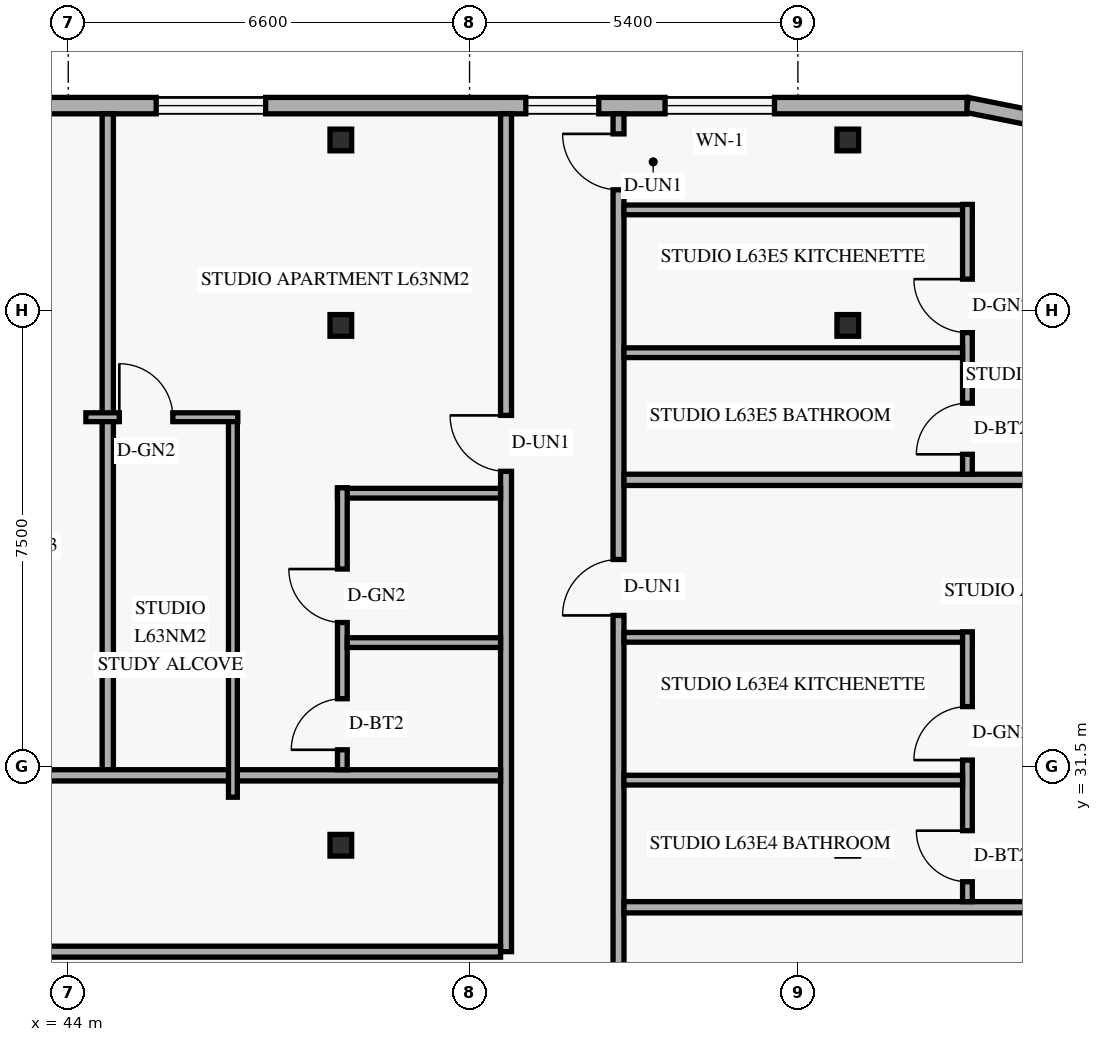
"""IFC4 building model, lengths in metres.
Left out: names, types, materials, properties, quantities, classifications, styles, units other than length and angle.
Written with IfcOpenShell. Run it as: python <this file> out.ifc"""

import sys

from ifc_helpers import new_model, si_unit, direction, frame, frame_2d, origin, origin_2d, place, context, subcontext, project, spatial, rectangle, hollow_rectangle, extrude, element, fill, save


model = new_model("IFC4")
c1 = context("Model", 3, precision=1e-05, world=origin(), true_north=direction((0.0, 1.0)))
c2 = subcontext(c1, "Body", "Model", "MODEL_VIEW")
j1 = project(units=[si_unit("LENGTHUNIT", "METRE"), si_unit("PLANEANGLEUNIT", "RADIAN")], contexts=[c1])
p1 = place(None, origin())
s1 = spatial("IfcSite", under=j1, at=p1, CompositionType="ELEMENT")
p2 = place(p1, origin())
s2 = spatial("IfcBuilding", under=s1, at=p2, CompositionType="ELEMENT")
p3 = place(p2, frame((0.0, 0.0, 242.4)))
s3 = spatial("IfcBuildingStorey", under=s2, at=p3, CompositionType="ELEMENT", Elevation=242.4)
for number, where, z_axis, x_axis in (
    (1, (48.42, 30.2, 0.0), (0.035, 0.0, 0.999), (0.0, 1.0, 0.0)),
    (2, (48.42, 38.75, 0.0), (0.035, 0.0, 0.999), (0.0, 1.0, 0.0)),
    (3, (48.42, 41.8, 0.0), (0.035, 0.0, 0.999), (0.0, 1.0, 0.0)),
):
    element("IfcColumn", number, at=place(p3, frame(where, z_axis=z_axis, x_axis=x_axis)), inside=s3, PredefinedType="COLUMN", context=c2, shape_type="SweptSolid", body=[
        extrude(hollow_rectangle(XDim=0.356, YDim=0.356, WallThickness=0.016, at=origin_2d()), origin(), (0.0, 0.0, 1.0), 3.602),
    ])
for number, where, z_axis, x_axis in (
    (4, (56.716, 30.2, 0.0), (0.058, 0.0, 0.998), (0.0, 1.0, 0.0)),
    (5, (56.716, 38.75, 0.0), (0.058, 0.0, 0.998), (0.0, 1.0, 0.0)),
    (6, (56.716, 41.8, 0.0), (0.058, 0.0, 0.998), (0.0, 1.0, 0.0)),
):
    element("IfcColumn", number, at=place(p3, frame(where, z_axis=z_axis, x_axis=x_axis)), inside=s3, PredefinedType="COLUMN", context=c2, shape_type="SweptSolid", body=[
        extrude(hollow_rectangle(XDim=0.356, YDim=0.356, WallThickness=0.016, at=origin_2d()), origin(), (0.0, 0.0, 1.0), 3.606),
    ])
p4 = place(p3, frame((60.146, 42.105, 0.0), z_axis=(0.0, 0.0, 1.0), x_axis=(-0.980809899341, 0.19496651342, 0.0)))
e7 = element("IfcWall", 7, at=p4, inside=s3, PredefinedType="SOLIDWALL", context=c2, shape_type="SweptSolid", body=[
    extrude(rectangle(XDim=1.389, YDim=0.25, at=frame_2d((0.694, 0.0))), origin(), (0.0, 0.0, 1.0), 3.36),
])
p5 = place(p3, frame((58.78, 42.365, 0.0), z_axis=(0.0, 0.0, 1.0), x_axis=(-1.0, 0.0, 0.0)))
e8 = element("IfcWall", 8, at=p5, inside=s3, PredefinedType="SOLIDWALL", context=c2, shape_type="SweptSolid", body=[
    extrude(rectangle(XDim=32.96, YDim=0.27, at=frame_2d((16.48, 0.0))), origin(), (0.0, 0.0, 1.0), 3.36),
])
p6 = place(p5, frame((17.735, 0.0, 0.85)))
e9 = element("IfcOpeningElement", 9, at=p6, cuts=e8, PredefinedType="OPENING", context=c2, shape_type="SweptSolid", body=[
    extrude(rectangle(XDim=1.8, YDim=1.6, at=frame_2d((0.9, 0.8))), frame((0.0, 0.145, 0.0), z_axis=(0.0, -1.0, 0.0), x_axis=(1.0, 0.0, 0.0)), (0.0, 0.0, 1.0), 0.29),
])
p7 = place(p5, frame((11.533, 0.0, 0.85)))
e10 = element("IfcOpeningElement", 10, at=p7, cuts=e8, PredefinedType="OPENING", context=c2, shape_type="SweptSolid", body=[
    extrude(rectangle(XDim=1.8, YDim=1.6, at=frame_2d((0.9, 0.8))), frame((0.0, 0.145, 0.0), z_axis=(0.0, -1.0, 0.0), x_axis=(1.0, 0.0, 0.0)), (0.0, 0.0, 1.0), 0.29),
])
p8 = place(p5, frame((6.055, 0.0, 0.85)))
e11 = element("IfcOpeningElement", 11, at=p8, cuts=e8, PredefinedType="OPENING", context=c2, shape_type="SweptSolid", body=[
    extrude(rectangle(XDim=1.2, YDim=1.5, at=frame_2d((0.6, 0.75))), frame((0.0, 0.145, 0.0), z_axis=(0.0, -1.0, 0.0), x_axis=(1.0, 0.0, 0.0)), (0.0, 0.0, 1.0), 0.29),
])
p9 = place(p5, frame((3.165, 0.0, 0.85)))
e12 = element("IfcOpeningElement", 12, at=p9, cuts=e8, PredefinedType="OPENING", context=c2, shape_type="SweptSolid", body=[
    extrude(rectangle(XDim=1.8, YDim=1.6, at=frame_2d((0.9, 0.8))), frame((0.0, 0.145, 0.0), z_axis=(0.0, -1.0, 0.0), x_axis=(1.0, 0.0, 0.0)), (0.0, 0.0, 1.0), 0.29),
])
p10 = place(p3, frame((51.2, 28.45, 0.0), z_axis=(0.0, 0.0, 1.0), x_axis=(0.0, 1.0, 0.0)))
e13 = element("IfcWall", 13, at=p10, inside=s3, PredefinedType="STANDARD", context=c2, shape_type="SweptSolid", body=[
    extrude(rectangle(XDim=13.78, YDim=0.18, at=frame_2d((6.89, 0.0))), origin(), (0.0, 0.0, 1.0), 2.803),
])
p11 = place(p10, frame((7.9, 0.0, 0.0)))
e14 = element("IfcOpeningElement", 14, at=p11, cuts=e13, PredefinedType="OPENING", context=c2, shape_type="SweptSolid", body=[
    extrude(rectangle(XDim=0.92, YDim=2.15, at=frame_2d((0.46, 1.075))), frame((0.0, 0.1, 0.0), z_axis=(0.0, -1.0, 0.0), x_axis=(1.0, 0.0, 0.0)), (0.0, 0.0, 1.0), 0.2),
])
p12 = place(p3, frame((37.64, 28.45, 0.0), z_axis=(0.0, 0.0, 1.0), x_axis=(1.0, 0.0, 0.0)))
e15 = element("IfcWall", 15, at=p12, inside=s3, PredefinedType="STANDARD", context=c2, shape_type="SweptSolid", body=[
    extrude(rectangle(XDim=13.47, YDim=0.18, at=frame_2d((6.735, 0.0))), origin(), (0.0, 0.0, 1.0), 2.803),
])
p13 = place(p3, frame((53.05, 5.77, 0.0), z_axis=(0.0, 0.0, 1.0), x_axis=(0.0, 1.0, 0.0)))
e16 = element("IfcWall", 16, at=p13, inside=s3, PredefinedType="STANDARD", context=c2, shape_type="SweptSolid", body=[
    extrude(rectangle(XDim=36.46, YDim=0.18, at=frame_2d((18.23, 0.0))), origin(), (0.0, 0.0, 1.0), 2.803),
])
p14 = place(p13, frame((1.357, 0.0, 0.0)))
e17 = element("IfcOpeningElement", 17, at=p14, cuts=e16, PredefinedType="OPENING", context=c2, shape_type="SweptSolid", body=[
    extrude(rectangle(XDim=0.92, YDim=2.15, at=frame_2d((0.46, 1.075))), frame((0.0, 0.1, 0.0), z_axis=(0.0, -1.0, 0.0), x_axis=(1.0, 0.0, 0.0)), (0.0, 0.0, 1.0), 0.2),
])
p15 = place(p13, frame((12.03, 0.0, 0.0)))
e18 = element("IfcOpeningElement", 18, at=p15, cuts=e16, PredefinedType="OPENING", context=c2, shape_type="SweptSolid", body=[
    extrude(rectangle(XDim=0.92, YDim=2.15, at=frame_2d((0.46, 1.075))), frame((0.0, 0.1, 0.0), z_axis=(0.0, -1.0, 0.0), x_axis=(1.0, 0.0, 0.0)), (0.0, 0.0, 1.0), 0.2),
])
p16 = place(p13, frame((20.27, 0.0, 0.0)))
e19 = element("IfcOpeningElement", 19, at=p16, cuts=e16, PredefinedType="OPENING", context=c2, shape_type="SweptSolid", body=[
    extrude(rectangle(XDim=0.92, YDim=2.15, at=frame_2d((0.46, 1.075))), frame((0.0, 0.1, 0.0), z_axis=(0.0, -1.0, 0.0), x_axis=(1.0, 0.0, 0.0)), (0.0, 0.0, 1.0), 0.2),
])
p17 = place(p13, frame((28.21, 0.0, 0.0)))
e20 = element("IfcOpeningElement", 20, at=p17, cuts=e16, PredefinedType="OPENING", context=c2, shape_type="SweptSolid", body=[
    extrude(rectangle(XDim=0.92, YDim=2.15, at=frame_2d((0.46, 1.075))), frame((0.0, 0.1, 0.0), z_axis=(0.0, -1.0, 0.0), x_axis=(1.0, 0.0, 0.0)), (0.0, 0.0, 1.0), 0.2),
])
p18 = place(p13, frame((35.21, 0.0, 0.0)))
e21 = element("IfcOpeningElement", 21, at=p18, cuts=e16, PredefinedType="OPENING", context=c2, shape_type="SweptSolid", body=[
    extrude(rectangle(XDim=0.92, YDim=2.15, at=frame_2d((0.46, 1.075))), frame((0.0, 0.1, 0.0), z_axis=(0.0, -1.0, 0.0), x_axis=(1.0, 0.0, 0.0)), (0.0, 0.0, 1.0), 0.2),
])
p19 = place(p3, frame((53.14, 29.18, 0.0), z_axis=(0.0, 0.0, 1.0), x_axis=(1.0, 0.0, 0.0)))
e22 = element("IfcWall", 22, at=p19, inside=s3, PredefinedType="PARTITIONING", context=c2, shape_type="SweptSolid", body=[
    extrude(rectangle(XDim=8.99, YDim=0.185, at=frame_2d((4.495, 0.0))), origin(), (0.0, 0.0, 1.0), 2.879),
])
p20 = place(p3, frame((53.14, 33.62, 0.0), z_axis=(0.0, 0.0, 1.0), x_axis=(1.0, 0.0, 0.0)))
e23 = element("IfcWall", 23, at=p20, inside=s3, PredefinedType="PLUMBINGWALL", context=c2, shape_type="SweptSolid", body=[
    extrude(rectangle(XDim=5.728, YDim=0.16, at=frame_2d((2.864, 0.0))), origin(), (0.0, 0.0, 1.0), 2.879),
])
p21 = place(p3, frame((58.788, 29.272, 0.0), z_axis=(0.0, 0.0, 1.0), x_axis=(0.0, 1.0, 0.0)))
e24 = element("IfcWall", 24, at=p21, inside=s3, PredefinedType="PLUMBINGWALL", context=c2, shape_type="SweptSolid", body=[
    extrude(rectangle(XDim=4.438, YDim=0.16, at=frame_2d((2.219, 0.0))), origin(), (0.0, 0.0, 1.0), 3.36),
])
p22 = place(p21, frame((0.327, 0.0, 0.0)))
e25 = element("IfcOpeningElement", 25, at=p22, cuts=e24, PredefinedType="OPENING", context=c2, shape_type="SweptSolid", body=[
    extrude(rectangle(XDim=0.84, YDim=2.12, at=frame_2d((0.42, 1.06))), frame((0.0, 0.09, 0.0), z_axis=(0.0, -1.0, 0.0), x_axis=(1.0, 0.0, 0.0)), (0.0, 0.0, 1.0), 0.18),
])
p23 = place(p21, frame((2.329, 0.0, 0.0)))
e26 = element("IfcOpeningElement", 26, at=p23, cuts=e24, PredefinedType="OPENING", context=c2, shape_type="SweptSolid", body=[
    extrude(rectangle(XDim=0.88, YDim=2.12, at=frame_2d((0.44, 1.06))), frame((0.0, 0.09, 0.0), z_axis=(0.0, -1.0, 0.0), x_axis=(1.0, 0.0, 0.0)), (0.0, 0.0, 1.0), 0.18),
])
p24 = place(p3, frame((53.14, 31.271, 0.0), z_axis=(0.0, 0.0, 1.0), x_axis=(1.0, 0.0, 0.0)))
e27 = element("IfcWall", 27, at=p24, inside=s3, PredefinedType="PLUMBINGWALL", context=c2, shape_type="SweptSolid", body=[
    extrude(rectangle(XDim=5.568, YDim=0.16, at=frame_2d((2.784, 0.0))), origin(), (0.0, 0.0, 1.0), 2.879),
])
p25 = place(p3, frame((53.14, 36.21, 0.0), z_axis=(0.0, 0.0, 1.0), x_axis=(1.0, 0.0, 0.0)))
e28 = element("IfcWall", 28, at=p25, inside=s3, PredefinedType="PARTITIONING", context=c2, shape_type="SweptSolid", body=[
    extrude(rectangle(XDim=8.99, YDim=0.185, at=frame_2d((4.495, 0.0))), origin(), (0.0, 0.0, 1.0), 2.879),
])
p26 = place(p3, frame((53.14, 40.65, 0.0), z_axis=(0.0, 0.0, 1.0), x_axis=(1.0, 0.0, 0.0)))
e29 = element("IfcWall", 29, at=p26, inside=s3, PredefinedType="PLUMBINGWALL", context=c2, shape_type="SweptSolid", body=[
    extrude(rectangle(XDim=5.728, YDim=0.16, at=frame_2d((2.864, 0.0))), origin(), (0.0, 0.0, 1.0), 2.879),
])
p27 = place(p3, frame((58.788, 36.302, 0.0), z_axis=(0.0, 0.0, 1.0), x_axis=(0.0, 1.0, 0.0)))
e30 = element("IfcWall", 30, at=p27, inside=s3, PredefinedType="PLUMBINGWALL", context=c2, shape_type="SweptSolid", body=[
    extrude(rectangle(XDim=4.438, YDim=0.16, at=frame_2d((2.219, 0.0))), origin(), (0.0, 0.0, 1.0), 3.36),
])
p28 = place(p27, frame((0.327, 0.0, 0.0)))
e31 = element("IfcOpeningElement", 31, at=p28, cuts=e30, PredefinedType="OPENING", context=c2, shape_type="SweptSolid", body=[
    extrude(rectangle(XDim=0.84, YDim=2.12, at=frame_2d((0.42, 1.06))), frame((0.0, 0.09, 0.0), z_axis=(0.0, -1.0, 0.0), x_axis=(1.0, 0.0, 0.0)), (0.0, 0.0, 1.0), 0.18),
])
p29 = place(p27, frame((2.329, 0.0, 0.0)))
e32 = element("IfcOpeningElement", 32, at=p29, cuts=e30, PredefinedType="OPENING", context=c2, shape_type="SweptSolid", body=[
    extrude(rectangle(XDim=0.88, YDim=2.12, at=frame_2d((0.44, 1.06))), frame((0.0, 0.09, 0.0), z_axis=(0.0, -1.0, 0.0), x_axis=(1.0, 0.0, 0.0)), (0.0, 0.0, 1.0), 0.18),
])
p30 = place(p3, frame((53.14, 38.301, 0.0), z_axis=(0.0, 0.0, 1.0), x_axis=(1.0, 0.0, 0.0)))
e33 = element("IfcWall", 33, at=p30, inside=s3, PredefinedType="PLUMBINGWALL", context=c2, shape_type="SweptSolid", body=[
    extrude(rectangle(XDim=5.568, YDim=0.16, at=frame_2d((2.784, 0.0))), origin(), (0.0, 0.0, 1.0), 2.879),
])
p31 = place(p3, frame((44.65, 31.35, 0.0), z_axis=(0.0, 0.0, 1.0), x_axis=(0.0, 1.0, 0.0)))
e34 = element("IfcWall", 34, at=p31, inside=s3, PredefinedType="PARTITIONING", context=c2, shape_type="SweptSolid", body=[
    extrude(rectangle(XDim=10.88, YDim=0.185, at=frame_2d((5.44, 0.0))), origin(), (0.0, 0.0, 1.0), 2.803),
])
p32 = place(p3, frame((38.173, 31.35, 0.0), z_axis=(0.0, 0.0, 1.0), x_axis=(1.0, 0.0, 0.0)))
e35 = element("IfcWall", 35, at=p32, inside=s3, PredefinedType="PARTITIONING", context=c2, shape_type="SweptSolid", body=[
    extrude(rectangle(XDim=12.938, YDim=0.185, at=frame_2d((6.469, 0.0))), origin(), (0.0, 0.0, 1.0), 2.803),
])
p33 = place(p3, frame((48.428, 35.99, 0.0), z_axis=(0.0, 0.0, 1.0), x_axis=(1.0, 0.0, 0.0)))
e36 = element("IfcWall", 36, at=p33, inside=s3, PredefinedType="PLUMBINGWALL", context=c2, shape_type="SweptSolid", body=[
    extrude(rectangle(XDim=2.682, YDim=0.16, at=frame_2d((1.341, 0.0))), origin(), (0.0, 0.0, 1.0), 2.803),
])
p34 = place(p3, frame((48.508, 31.442, 0.0), z_axis=(0.0, 0.0, 1.0), x_axis=(0.0, 1.0, 0.0)))
e37 = element("IfcWall", 37, at=p34, inside=s3, PredefinedType="PLUMBINGWALL", context=c2, shape_type="SweptSolid", body=[
    extrude(rectangle(XDim=4.638, YDim=0.16, at=frame_2d((2.319, 0.0))), origin(), (0.0, 0.0, 1.0), 2.803),
])
p35 = place(p34, frame((0.327, 0.0, 0.0)))
e38 = element("IfcOpeningElement", 38, at=p35, cuts=e37, PredefinedType="OPENING", context=c2, shape_type="SweptSolid", body=[
    extrude(rectangle(XDim=0.84, YDim=2.12, at=frame_2d((0.42, 1.06))), frame((0.0, 0.09, 0.0), z_axis=(0.0, -1.0, 0.0), x_axis=(1.0, 0.0, 0.0)), (0.0, 0.0, 1.0), 0.18),
])
p36 = place(p34, frame((2.42, 0.0, 0.0)))
e39 = element("IfcOpeningElement", 39, at=p36, cuts=e37, PredefinedType="OPENING", context=c2, shape_type="SweptSolid", body=[
    extrude(rectangle(XDim=0.88, YDim=2.12, at=frame_2d((0.44, 1.06))), frame((0.0, 0.09, 0.0), z_axis=(0.0, -1.0, 0.0), x_axis=(1.0, 0.0, 0.0)), (0.0, 0.0, 1.0), 0.18),
])
p37 = place(p3, frame((48.588, 33.533, 0.0), z_axis=(0.0, 0.0, 1.0), x_axis=(1.0, 0.0, 0.0)))
e40 = element("IfcWall", 40, at=p37, inside=s3, PredefinedType="PLUMBINGWALL", context=c2, shape_type="SweptSolid", body=[
    extrude(rectangle(XDim=2.522, YDim=0.16, at=frame_2d((1.261, 0.0))), origin(), (0.0, 0.0, 1.0), 2.803),
])
p38 = place(p3, frame((46.708, 30.99, 0.0), z_axis=(0.0, 0.0, 1.0), x_axis=(0.0, 1.0, 0.0)))
e41 = element("IfcWall", 41, at=p38, inside=s3, PredefinedType="PARTITIONING", context=c2, shape_type="SweptSolid", body=[
    extrude(rectangle(XDim=6.25, YDim=0.145, at=frame_2d((3.125, 0.0))), origin(), (0.0, 0.0, 1.0), 3.039),
])
p39 = place(p3, frame((44.29, 37.24, 0.0), z_axis=(0.0, 0.0, 1.0), x_axis=(1.0, 0.0, 0.0)))
e42 = element("IfcWall", 42, at=p39, inside=s3, PredefinedType="PARTITIONING", context=c2, shape_type="SweptSolid", body=[
    extrude(rectangle(XDim=2.498, YDim=0.145, at=frame_2d((1.249, 0.0))), origin(), (0.0, 0.0, 1.0), 3.36),
])
p40 = place(p39, frame((0.55, 0.0, 0.0)))
e43 = element("IfcOpeningElement", 43, at=p40, cuts=e42, PredefinedType="OPENING", context=c2, shape_type="SweptSolid", body=[
    extrude(rectangle(XDim=0.88, YDim=2.12, at=frame_2d((0.44, 1.06))), frame((0.0, 0.083, 0.0), z_axis=(0.0, -1.0, 0.0), x_axis=(1.0, 0.0, 0.0)), (0.0, 0.0, 1.0), 0.165),
])
p41 = place(p7, origin())
e44 = element("IfcWindow", 44, at=p41, inside=s3, PartitioningType="SINGLE_PANEL", PredefinedType="WINDOW", context=c2, shape_type="SweptSolid", body=[
    extrude(rectangle(XDim=1.8, YDim=1.6, at=frame_2d((0.9, 0.8))), frame((0.0, 0.03, 0.0), z_axis=(0.0, -1.0, 0.0), x_axis=(1.0, 0.0, 0.0)), (0.0, 0.0, 1.0), 0.06),
])
fill(e10, e44)
p42 = place(p8, origin())
e45 = element("IfcWindow", 45, at=p42, inside=s3, PartitioningType="SINGLE_PANEL", PredefinedType="WINDOW", context=c2, shape_type="SweptSolid", body=[
    extrude(rectangle(XDim=1.2, YDim=1.5, at=frame_2d((0.6, 0.75))), frame((0.0, 0.03, 0.0), z_axis=(0.0, -1.0, 0.0), x_axis=(1.0, 0.0, 0.0)), (0.0, 0.0, 1.0), 0.06),
])
fill(e11, e45)
p43 = place(p9, origin())
e46 = element("IfcWindow", 46, at=p43, inside=s3, PartitioningType="SINGLE_PANEL", PredefinedType="WINDOW", context=c2, shape_type="SweptSolid", body=[
    extrude(rectangle(XDim=1.8, YDim=1.6, at=frame_2d((0.9, 0.8))), frame((0.0, 0.03, 0.0), z_axis=(0.0, -1.0, 0.0), x_axis=(1.0, 0.0, 0.0)), (0.0, 0.0, 1.0), 0.06),
])
fill(e12, e46)
p44 = place(p17, origin())
e47 = element("IfcDoor", 47, at=p44, inside=s3, OperationType="SINGLE_SWING_LEFT", PredefinedType="DOOR", context=c2, shape_type="SweptSolid", body=[
    extrude(rectangle(XDim=0.92, YDim=2.15, at=frame_2d((0.46, 1.075))), frame((0.0, 0.025, 0.0), z_axis=(0.0, -1.0, 0.0), x_axis=(1.0, 0.0, 0.0)), (0.0, 0.0, 1.0), 0.05),
])
fill(e20, e47)
p45 = place(p22, origin())
e48 = element("IfcDoor", 48, at=p45, inside=s3, OperationType="SINGLE_SWING_RIGHT", PredefinedType="DOOR", context=c2, shape_type="SweptSolid", body=[
    extrude(rectangle(XDim=0.84, YDim=2.12, at=frame_2d((0.42, 1.06))), frame((0.0, 0.025, 0.0), z_axis=(0.0, -1.0, 0.0), x_axis=(1.0, 0.0, 0.0)), (0.0, 0.0, 1.0), 0.05),
])
fill(e25, e48)
p46 = place(p23, origin())
e49 = element("IfcDoor", 49, at=p46, inside=s3, OperationType="SINGLE_SWING_LEFT", PredefinedType="DOOR", context=c2, shape_type="SweptSolid", body=[
    extrude(rectangle(XDim=0.88, YDim=2.12, at=frame_2d((0.44, 1.06))), frame((0.0, 0.025, 0.0), z_axis=(0.0, -1.0, 0.0), x_axis=(1.0, 0.0, 0.0)), (0.0, 0.0, 1.0), 0.05),
])
fill(e26, e49)
p47 = place(p18, origin())
e50 = element("IfcDoor", 50, at=p47, inside=s3, OperationType="SINGLE_SWING_RIGHT", PredefinedType="DOOR", context=c2, shape_type="SweptSolid", body=[
    extrude(rectangle(XDim=0.92, YDim=2.15, at=frame_2d((0.46, 1.075))), frame((0.0, 0.025, 0.0), z_axis=(0.0, -1.0, 0.0), x_axis=(1.0, 0.0, 0.0)), (0.0, 0.0, 1.0), 0.05),
])
fill(e21, e50)
p48 = place(p28, origin())
e51 = element("IfcDoor", 51, at=p48, inside=s3, OperationType="SINGLE_SWING_LEFT", PredefinedType="DOOR", context=c2, shape_type="SweptSolid", body=[
    extrude(rectangle(XDim=0.84, YDim=2.12, at=frame_2d((0.42, 1.06))), frame((0.0, 0.025, 0.0), z_axis=(0.0, -1.0, 0.0), x_axis=(1.0, 0.0, 0.0)), (0.0, 0.0, 1.0), 0.05),
])
fill(e31, e51)
p49 = place(p29, origin())
e52 = element("IfcDoor", 52, at=p49, inside=s3, OperationType="SINGLE_SWING_RIGHT", PredefinedType="DOOR", context=c2, shape_type="SweptSolid", body=[
    extrude(rectangle(XDim=0.88, YDim=2.12, at=frame_2d((0.44, 1.06))), frame((0.0, 0.025, 0.0), z_axis=(0.0, -1.0, 0.0), x_axis=(1.0, 0.0, 0.0)), (0.0, 0.0, 1.0), 0.05),
])
fill(e32, e52)
p50 = place(p40, origin())
e53 = element("IfcDoor", 53, at=p50, inside=s3, OperationType="SINGLE_SWING_LEFT", PredefinedType="DOOR", context=c2, shape_type="SweptSolid", body=[
    extrude(rectangle(XDim=0.88, YDim=2.12, at=frame_2d((0.44, 1.06))), frame((0.0, 0.025, 0.0), z_axis=(0.0, -1.0, 0.0), x_axis=(1.0, 0.0, 0.0)), (0.0, 0.0, 1.0), 0.05),
])
fill(e43, e53)
p51 = place(p11, origin())
e54 = element("IfcDoor", 54, at=p51, inside=s3, OperationType="SINGLE_SWING_RIGHT", PredefinedType="DOOR", context=c2, shape_type="SweptSolid", body=[
    extrude(rectangle(XDim=0.92, YDim=2.15, at=frame_2d((0.46, 1.075))), frame((0.0, 0.025, 0.0), z_axis=(0.0, -1.0, 0.0), x_axis=(1.0, 0.0, 0.0)), (0.0, 0.0, 1.0), 0.05),
])
fill(e14, e54)
p52 = place(p35, origin())
e55 = element("IfcDoor", 55, at=p52, inside=s3, OperationType="SINGLE_SWING_LEFT", PredefinedType="DOOR", context=c2, shape_type="SweptSolid", body=[
    extrude(rectangle(XDim=0.84, YDim=2.12, at=frame_2d((0.42, 1.06))), frame((0.0, 0.025, 0.0), z_axis=(0.0, -1.0, 0.0), x_axis=(1.0, 0.0, 0.0)), (0.0, 0.0, 1.0), 0.05),
])
fill(e38, e55)
p53 = place(p36, origin())
e56 = element("IfcDoor", 56, at=p53, inside=s3, OperationType="SINGLE_SWING_RIGHT", PredefinedType="DOOR", context=c2, shape_type="SweptSolid", body=[
    extrude(rectangle(XDim=0.88, YDim=2.12, at=frame_2d((0.44, 1.06))), frame((0.0, 0.025, 0.0), z_axis=(0.0, -1.0, 0.0), x_axis=(1.0, 0.0, 0.0)), (0.0, 0.0, 1.0), 0.05),
])
fill(e39, e56)
save(model, sys.argv[1])
